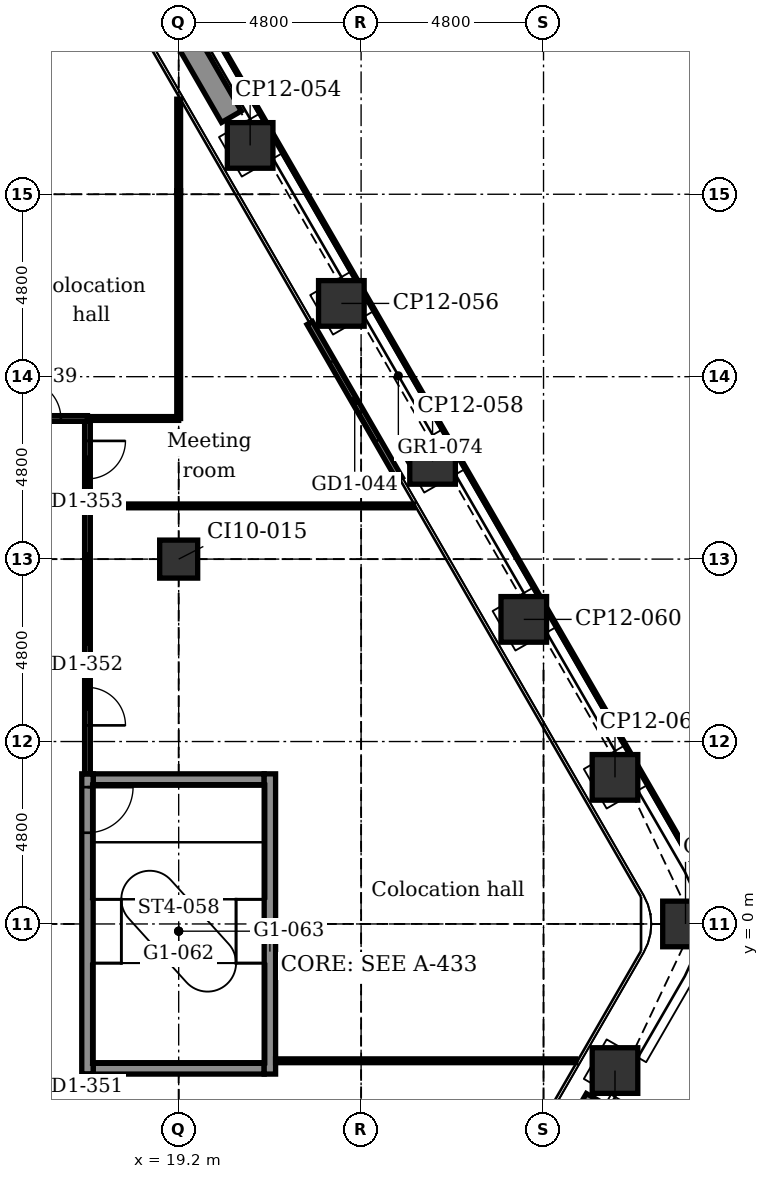
"""IFC4 building model, lengths in metres.
Left out: names, types, materials, properties, quantities, classifications, styles, units other than length and angle.
Written with IfcOpenShell. Run it as: python <this file> out.ifc"""

import sys

from ifc_helpers import new_model, si_unit, direction, frame, frame_2d, origin, origin_2d, place, context, subcontext, project, spatial, rectangle, extrude, element, fill, save


model = new_model("IFC4")
c1 = context("Model", 3, precision=1e-05, world=origin(), true_north=direction((0.0, 1.0)))
c2 = subcontext(c1, "Body", "Model", "MODEL_VIEW")
j1 = project(units=[si_unit("LENGTHUNIT", "METRE"), si_unit("PLANEANGLEUNIT", "RADIAN")], contexts=[c1])
p1 = place(None, origin())
s1 = spatial("IfcSite", under=j1, at=p1, CompositionType="ELEMENT")
p2 = place(p1, origin())
s2 = spatial("IfcBuilding", under=s1, at=p2, CompositionType="ELEMENT")
p3 = place(p2, frame((0.0, 0.0, 122.9)))
s3 = spatial("IfcBuildingStorey", under=s2, at=p3, CompositionType="ELEMENT", Elevation=122.9)
for number, where, z_axis, x_axis in (
    (1, (21.08, 20.485, -0.2), (0.0, 0.0, 1.0), (0.866, 0.5, 0.0)),
    (2, (23.48, 16.328, -0.2), (0.0, 0.0, 1.0), (0.866, 0.5, 0.0)),
    (3, (25.88, 12.171, -0.2), (0.0, 0.0, 1.0), (0.866, 0.5, 0.0)),
    (4, (28.28, 8.014, -0.2), (0.0, 0.0, 1.0), (0.866, 0.5, 0.0)),
    (5, (30.68, 3.857, -0.2), (0.0, 0.0, 1.0), (0.866, 0.5, 0.0)),
    (6, (32.536, 0.0, -0.2), (0.0, 0.0, 1.0), (1.0, 0.0, 0.0)),
    (7, (30.68, -3.857, -0.2), (0.0, 0.0, 1.0), (0.5, 0.866, 0.0)),
):
    element("IfcColumn", number, at=place(p3, frame(where, z_axis=z_axis, x_axis=x_axis)), inside=s3, PredefinedType="COLUMN", context=c2, shape_type="SweptSolid", body=[
        extrude(rectangle(XDim=1.2, YDim=1.2, at=origin_2d()), origin(), (0.0, 0.0, 1.0), 4.4),
    ])
p4 = place(p3, frame((19.2, 9.6, -0.2), z_axis=(0.0, 0.0, 1.0), x_axis=(1.0, 0.0, 0.0)))
e8 = element("IfcColumn", 8, at=p4, inside=s3, PredefinedType="COLUMN", context=c2, shape_type="SweptSolid", body=[
    extrude(rectangle(XDim=1.0, YDim=1.0, at=origin_2d()), origin(), (0.0, 0.0, 1.0), 4.4),
])
for number, where, z_axis, x_axis in (
    (9, (16.95, -3.8, -0.2), (0.0, 0.0, 1.0), (1.0, 0.0, 0.0)),
    (10, (16.95, 3.8, -0.2), (0.0, 0.0, 1.0), (1.0, 0.0, 0.0)),
):
    element("IfcWall", number, at=place(p3, frame(where, z_axis=z_axis, x_axis=x_axis)), inside=s3, PredefinedType="STANDARD", context=c2, shape_type="SweptSolid", body=[
        extrude(rectangle(XDim=4.5, YDim=0.3, at=frame_2d((2.25, 0.0))), origin(), (0.0, 0.0, 1.0), 4.4),
    ])
p5 = place(p3, frame((16.8, -3.95, -0.2), z_axis=(0.0, 0.0, 1.0), x_axis=(0.0, 1.0, 0.0)))
e11 = element("IfcWall", 11, at=p5, inside=s3, PredefinedType="STANDARD", context=c2, shape_type="SweptSolid", body=[
    extrude(rectangle(XDim=7.9, YDim=0.3, at=frame_2d((3.95, 0.0))), origin(), (0.0, 0.0, 1.0), 4.4),
])
p6 = place(p5, frame((6.35, 0.0, 0.2)))
e12 = element("IfcOpeningElement", 12, at=p6, cuts=e11, PredefinedType="OPENING", context=c2, shape_type="SweptSolid", body=[
    extrude(rectangle(XDim=1.2, YDim=2.1, at=frame_2d((0.6, 1.05))), frame((0.0, 0.16, 0.0), z_axis=(0.0, -1.0, 0.0), x_axis=(1.0, 0.0, 0.0)), (0.0, 0.0, 1.0), 0.32),
])
p7 = place(p3, frame((21.6, -3.95, -0.2), z_axis=(0.0, 0.0, 1.0), x_axis=(0.0, 1.0, 0.0)))
e13 = element("IfcWall", 13, at=p7, inside=s3, PredefinedType="STANDARD", context=c2, shape_type="SweptSolid", body=[
    extrude(rectangle(XDim=7.9, YDim=0.3, at=frame_2d((3.95, 0.0))), origin(), (0.0, 0.0, 1.0), 4.4),
])
p8 = place(p3, frame((22.647, 15.812, 0.0), z_axis=(0.0, 0.0, 1.0), x_axis=(0.499978080042, -0.866038058908, 0.0)))
e14 = element("IfcWall", 14, at=p8, inside=s3, PredefinedType="PARTITIONING", context=c2, shape_type="SweptSolid", body=[
    extrude(rectangle(XDim=4.74, YDim=0.16, at=frame_2d((2.37, 0.0))), origin(), (0.0, 0.0, 1.0), 4.2),
])
p9 = place(p8, frame((1.17, 0.0, 0.0)))
e15 = element("IfcOpeningElement", 15, at=p9, cuts=e14, PredefinedType="OPENING", context=c2, shape_type="SweptSolid", body=[
    extrude(rectangle(XDim=2.4, YDim=2.4, at=frame_2d((1.2, 1.2))), frame((0.0, 0.09, 0.0), z_axis=(0.0, -1.0, 0.0), x_axis=(1.0, 0.0, 0.0)), (0.0, 0.0, 1.0), 0.18),
])
for number, where, z_axis, x_axis in (
    (16, (19.087, 23.837, 0.0), (0.0, 0.0, 1.0), (0.5, -0.866, 0.0)),
    (17, (30.187, -4.611, 0.0), (0.0, 0.0, 1.0), (-0.5, -0.866, 0.0)),
):
    element("IfcWall", number, at=place(p3, frame(where, z_axis=z_axis, x_axis=x_axis)), inside=s3, PredefinedType="USERDEFINED", context=c2, shape_type="SweptSolid", body=[
        extrude(rectangle(XDim=3.0, YDim=0.6, at=frame_2d((1.5, 0.0))), origin(), (0.0, 0.0, 1.0), 0.7),
    ])
p10 = place(p3, frame((19.2, 13.3, 0.0), z_axis=(0.0, 0.0, 1.0), x_axis=(0.0, 1.0, 0.0)))
e18 = element("IfcWall", 18, at=p10, inside=s3, PredefinedType="PARTITIONING", context=c2, shape_type="SweptSolid", body=[
    extrude(rectangle(XDim=5.993, YDim=0.1, at=frame_2d((2.997, 0.0))), origin(), (0.0, 0.0, 1.0), 3.743),
])
p11 = place(p3, frame((19.2, 19.293, 0.0), z_axis=(0.0, 0.0, 1.0), x_axis=(0.0, 1.0, 0.0)))
e19 = element("IfcWall", 19, at=p11, inside=s3, PredefinedType="PARTITIONING", context=c2, shape_type="SweptSolid", body=[
    extrude(rectangle(XDim=2.408, YDim=0.1, at=frame_2d((1.204, 0.0))), origin(), (0.0, 0.0, 1.0), 3.89),
])
p12 = place(p3, frame((16.8, -13.3, 0.0), z_axis=(0.0, 0.0, 1.0), x_axis=(0.0, 1.0, 0.0)))
e20 = element("IfcWall", 20, at=p12, inside=s3, PredefinedType="PARTITIONING", context=c2, shape_type="SweptSolid", body=[
    extrude(rectangle(XDim=9.35, YDim=0.15, at=frame_2d((4.675, 0.0))), origin(), (0.0, 0.0, 1.0), 4.2),
])
p13 = place(p12, frame((1.64, 0.0, 0.0)))
e21 = element("IfcOpeningElement", 21, at=p13, cuts=e20, PredefinedType="OPENING", context=c2, shape_type="SweptSolid", body=[
    extrude(rectangle(XDim=1.0, YDim=2.1, at=frame_2d((0.5, 1.05))), frame((0.0, 0.085, 0.0), z_axis=(0.0, -1.0, 0.0), x_axis=(1.0, 0.0, 0.0)), (0.0, 0.0, 1.0), 0.17),
])
p14 = place(p12, frame((4.605, 0.0, 0.0)))
e22 = element("IfcOpeningElement", 22, at=p14, cuts=e20, PredefinedType="OPENING", context=c2, shape_type="SweptSolid", body=[
    extrude(rectangle(XDim=1.0, YDim=2.1, at=frame_2d((0.5, 1.05))), frame((0.0, 0.085, 0.0), z_axis=(0.0, -1.0, 0.0), x_axis=(1.0, 0.0, 0.0)), (0.0, 0.0, 1.0), 0.17),
])
p15 = place(p12, frame((7.4, 0.0, 0.0)))
e23 = element("IfcOpeningElement", 23, at=p15, cuts=e20, PredefinedType="OPENING", context=c2, shape_type="SweptSolid", body=[
    extrude(rectangle(XDim=1.0, YDim=2.1, at=frame_2d((0.5, 1.05))), frame((0.0, 0.085, 0.0), z_axis=(0.0, -1.0, 0.0), x_axis=(1.0, 0.0, 0.0)), (0.0, 0.0, 1.0), 0.17),
])
p16 = place(p3, frame((16.8, 3.95, 0.0), z_axis=(0.0, 0.0, 1.0), x_axis=(0.0, 1.0, 0.0)))
e24 = element("IfcWall", 24, at=p16, inside=s3, PredefinedType="PARTITIONING", context=c2, shape_type="SweptSolid", body=[
    extrude(rectangle(XDim=9.35, YDim=0.15, at=frame_2d((4.675, 0.0))), origin(), (0.0, 0.0, 1.0), 4.2),
])
p17 = place(p16, frame((1.275, 0.0, 0.0)))
e25 = element("IfcOpeningElement", 25, at=p17, cuts=e24, PredefinedType="OPENING", context=c2, shape_type="SweptSolid", body=[
    extrude(rectangle(XDim=1.0, YDim=2.1, at=frame_2d((0.5, 1.05))), frame((0.0, 0.085, 0.0), z_axis=(0.0, -1.0, 0.0), x_axis=(1.0, 0.0, 0.0)), (0.0, 0.0, 1.0), 0.17),
])
p18 = place(p16, frame((7.76, 0.0, 0.0)))
e26 = element("IfcOpeningElement", 26, at=p18, cuts=e24, PredefinedType="OPENING", context=c2, shape_type="SweptSolid", body=[
    extrude(rectangle(XDim=1.0, YDim=2.1, at=frame_2d((0.5, 1.05))), frame((0.0, 0.085, 0.0), z_axis=(0.0, -1.0, 0.0), x_axis=(1.0, 0.0, 0.0)), (0.0, 0.0, 1.0), 0.17),
])
p19 = place(p16, frame((3.4, 0.0, 0.9)))
e27 = element("IfcOpeningElement", 27, at=p19, cuts=e24, PredefinedType="OPENING", context=c2, shape_type="SweptSolid", body=[
    extrude(rectangle(XDim=2.4, YDim=1.5, at=frame_2d((1.2, 0.75))), frame((0.0, 0.085, 0.0), z_axis=(0.0, -1.0, 0.0), x_axis=(1.0, 0.0, 0.0)), (0.0, 0.0, 1.0), 0.17),
])
p20 = place(p3, frame((21.75, -3.6, 0.0), z_axis=(0.0, 0.0, 1.0), x_axis=(1.0, 0.0, 0.0)))
e28 = element("IfcWall", 28, at=p20, inside=s3, PredefinedType="PARTITIONING", context=c2, shape_type="SweptSolid", body=[
    extrude(rectangle(XDim=7.901, YDim=0.1, at=frame_2d((3.95, 0.0))), origin(), (0.0, 0.0, 1.0), 4.2),
])
p21 = place(p3, frame((16.8, 11.0, 0.0), z_axis=(0.0, 0.0, 1.0), x_axis=(1.0, 0.0, 0.0)))
e29 = element("IfcWall", 29, at=p21, inside=s3, PredefinedType="PARTITIONING", context=c2, shape_type="SweptSolid", body=[
    extrude(rectangle(XDim=8.578, YDim=0.1, at=frame_2d((4.289, 0.0))), origin(), (0.0, 0.0, 1.0), 4.2),
])
p22 = place(p3, frame((16.8, 13.3, 0.0), z_axis=(0.0, 0.0, 1.0), x_axis=(1.0, 0.0, 0.0)))
e30 = element("IfcWall", 30, at=p22, inside=s3, PredefinedType="PARTITIONING", context=c2, shape_type="SweptSolid", body=[
    extrude(rectangle(XDim=2.4, YDim=0.1, at=frame_2d((1.2, 0.0))), origin(), (0.0, 0.0, 1.0), 4.2),
])
p23 = place(p3, frame((-19.2, 13.3, 0.0), z_axis=(0.0, 0.0, 1.0), x_axis=(1.0, 0.0, 0.0)))
e31 = element("IfcWall", 31, at=p23, inside=s3, PredefinedType="PARTITIONING", context=c2, shape_type="SweptSolid", body=[
    extrude(rectangle(XDim=36.0, YDim=0.15, at=frame_2d((18.0, 0.0))), origin(), (0.0, 0.0, 1.0), 4.2),
])
p24 = place(p23, frame((4.3, 0.0, 0.0)))
e32 = element("IfcOpeningElement", 32, at=p24, cuts=e31, PredefinedType="OPENING", context=c2, shape_type="SweptSolid", body=[
    extrude(rectangle(XDim=1.0, YDim=2.1, at=frame_2d((0.5, 1.05))), frame((0.0, 0.085, 0.0), z_axis=(0.0, -1.0, 0.0), x_axis=(1.0, 0.0, 0.0)), (0.0, 0.0, 1.0), 0.17),
])
p25 = place(p23, frame((7.9, 0.0, 0.0)))
e33 = element("IfcOpeningElement", 33, at=p25, cuts=e31, PredefinedType="OPENING", context=c2, shape_type="SweptSolid", body=[
    extrude(rectangle(XDim=1.0, YDim=2.1, at=frame_2d((0.5, 1.05))), frame((0.0, 0.085, 0.0), z_axis=(0.0, -1.0, 0.0), x_axis=(1.0, 0.0, 0.0)), (0.0, 0.0, 1.0), 0.17),
])
p26 = place(p23, frame((11.935, 0.0, 0.0)))
e34 = element("IfcOpeningElement", 34, at=p26, cuts=e31, PredefinedType="OPENING", context=c2, shape_type="SweptSolid", body=[
    extrude(rectangle(XDim=1.0, YDim=2.1, at=frame_2d((0.5, 1.05))), frame((0.0, 0.085, 0.0), z_axis=(0.0, -1.0, 0.0), x_axis=(1.0, 0.0, 0.0)), (0.0, 0.0, 1.0), 0.17),
])
p27 = place(p23, frame((15.1, 0.0, 0.0)))
e35 = element("IfcOpeningElement", 35, at=p27, cuts=e31, PredefinedType="OPENING", context=c2, shape_type="SweptSolid", body=[
    extrude(rectangle(XDim=1.0, YDim=2.1, at=frame_2d((0.5, 1.05))), frame((0.0, 0.085, 0.0), z_axis=(0.0, -1.0, 0.0), x_axis=(1.0, 0.0, 0.0)), (0.0, 0.0, 1.0), 0.17),
])
p28 = place(p23, frame((17.675, 0.0, 0.0)))
e36 = element("IfcOpeningElement", 36, at=p28, cuts=e31, PredefinedType="OPENING", context=c2, shape_type="SweptSolid", body=[
    extrude(rectangle(XDim=1.0, YDim=2.1, at=frame_2d((0.5, 1.05))), frame((0.0, 0.085, 0.0), z_axis=(0.0, -1.0, 0.0), x_axis=(1.0, 0.0, 0.0)), (0.0, 0.0, 1.0), 0.17),
])
p29 = place(p23, frame((19.9, 0.0, 0.0)))
e37 = element("IfcOpeningElement", 37, at=p29, cuts=e31, PredefinedType="OPENING", context=c2, shape_type="SweptSolid", body=[
    extrude(rectangle(XDim=1.0, YDim=2.1, at=frame_2d((0.5, 1.05))), frame((0.0, 0.085, 0.0), z_axis=(0.0, -1.0, 0.0), x_axis=(1.0, 0.0, 0.0)), (0.0, 0.0, 1.0), 0.17),
])
p30 = place(p23, frame((22.375, 0.0, 0.0)))
e38 = element("IfcOpeningElement", 38, at=p30, cuts=e31, PredefinedType="OPENING", context=c2, shape_type="SweptSolid", body=[
    extrude(rectangle(XDim=1.0, YDim=2.1, at=frame_2d((0.5, 1.05))), frame((0.0, 0.085, 0.0), z_axis=(0.0, -1.0, 0.0), x_axis=(1.0, 0.0, 0.0)), (0.0, 0.0, 1.0), 0.17),
])
p31 = place(p23, frame((26.625, 0.0, 0.0)))
e39 = element("IfcOpeningElement", 39, at=p31, cuts=e31, PredefinedType="OPENING", context=c2, shape_type="SweptSolid", body=[
    extrude(rectangle(XDim=1.0, YDim=2.1, at=frame_2d((0.5, 1.05))), frame((0.0, 0.085, 0.0), z_axis=(0.0, -1.0, 0.0), x_axis=(1.0, 0.0, 0.0)), (0.0, 0.0, 1.0), 0.17),
])
p32 = place(p23, frame((29.975, 0.0, 0.0)))
e40 = element("IfcOpeningElement", 40, at=p32, cuts=e31, PredefinedType="OPENING", context=c2, shape_type="SweptSolid", body=[
    extrude(rectangle(XDim=1.0, YDim=2.1, at=frame_2d((0.5, 1.05))), frame((0.0, 0.085, 0.0), z_axis=(0.0, -1.0, 0.0), x_axis=(1.0, 0.0, 0.0)), (0.0, 0.0, 1.0), 0.17),
])
p33 = place(p23, frame((34.3, 0.0, 0.0)))
e41 = element("IfcOpeningElement", 41, at=p33, cuts=e31, PredefinedType="OPENING", context=c2, shape_type="SweptSolid", body=[
    extrude(rectangle(XDim=1.0, YDim=2.1, at=frame_2d((0.5, 1.05))), frame((0.0, 0.085, 0.0), z_axis=(0.0, -1.0, 0.0), x_axis=(1.0, 0.0, 0.0)), (0.0, 0.0, 1.0), 0.17),
])
p34 = place(p9, origin())
e42 = element("IfcDoor", 42, at=p34, inside=s3, OperationType="DOUBLE_DOOR_SLIDING", PredefinedType="DOOR", context=c2, shape_type="SweptSolid", body=[
    extrude(rectangle(XDim=2.4, YDim=2.4, at=frame_2d((1.2, 1.2))), frame((0.0, 0.025, 0.0), z_axis=(0.0, -1.0, 0.0), x_axis=(1.0, 0.0, 0.0)), (0.0, 0.0, 1.0), 0.05),
])
fill(e15, e42)
p35 = place(p33, origin())
e43 = element("IfcDoor", 43, at=p35, inside=s3, OperationType="SINGLE_SWING_LEFT", PredefinedType="DOOR", context=c2, shape_type="SweptSolid", body=[
    extrude(rectangle(XDim=1.0, YDim=2.1, at=frame_2d((0.5, 1.05))), frame((0.0, 0.025, 0.0), z_axis=(0.0, -1.0, 0.0), x_axis=(1.0, 0.0, 0.0)), (0.0, 0.0, 1.0), 0.05),
])
fill(e41, e43)
p36 = place(p17, frame((1.0, 0.0, 0.0), z_axis=(0.0, 0.0, 1.0), x_axis=(-1.0, 0.0, 0.0)))
e44 = element("IfcDoor", 44, at=p36, inside=s3, OperationType="SINGLE_SWING_LEFT", PredefinedType="DOOR", context=c2, shape_type="SweptSolid", body=[
    extrude(rectangle(XDim=1.0, YDim=2.1, at=frame_2d((0.5, 1.05))), frame((0.0, 0.025, 0.0), z_axis=(0.0, -1.0, 0.0), x_axis=(1.0, 0.0, 0.0)), (0.0, 0.0, 1.0), 0.05),
])
fill(e25, e44)
p37 = place(p18, frame((1.0, 0.0, 0.0), z_axis=(0.0, 0.0, 1.0), x_axis=(-1.0, 0.0, 0.0)))
e45 = element("IfcDoor", 45, at=p37, inside=s3, OperationType="SINGLE_SWING_RIGHT", PredefinedType="DOOR", context=c2, shape_type="SweptSolid", body=[
    extrude(rectangle(XDim=1.0, YDim=2.1, at=frame_2d((0.5, 1.05))), frame((0.0, 0.025, 0.0), z_axis=(0.0, -1.0, 0.0), x_axis=(1.0, 0.0, 0.0)), (0.0, 0.0, 1.0), 0.05),
])
fill(e26, e45)
p38 = place(p6, frame((1.2, 0.0, 0.0), z_axis=(0.0, 0.0, 1.0), x_axis=(-1.0, 0.0, 0.0)))
e46 = element("IfcDoor", 46, at=p38, inside=s3, OperationType="SINGLE_SWING_RIGHT", PredefinedType="DOOR", context=c2, shape_type="SweptSolid", body=[
    extrude(rectangle(XDim=1.2, YDim=2.1, at=frame_2d((0.6, 1.05))), frame((0.0, 0.025, 0.0), z_axis=(0.0, -1.0, 0.0), x_axis=(1.0, 0.0, 0.0)), (0.0, 0.0, 1.0), 0.05),
])
fill(e12, e46)
p39 = place(p19, origin())
e47 = element("IfcWindow", 47, at=p39, inside=s3, PartitioningType="SINGLE_PANEL", PredefinedType="WINDOW", context=c2, shape_type="SweptSolid", body=[
    extrude(rectangle(XDim=2.4, YDim=1.5, at=frame_2d((1.2, 0.75))), frame((0.0, 0.03, 0.0), z_axis=(0.0, -1.0, 0.0), x_axis=(1.0, 0.0, 0.0)), (0.0, 0.0, 1.0), 0.06),
])
fill(e27, e47)
save(model, sys.argv[1])
